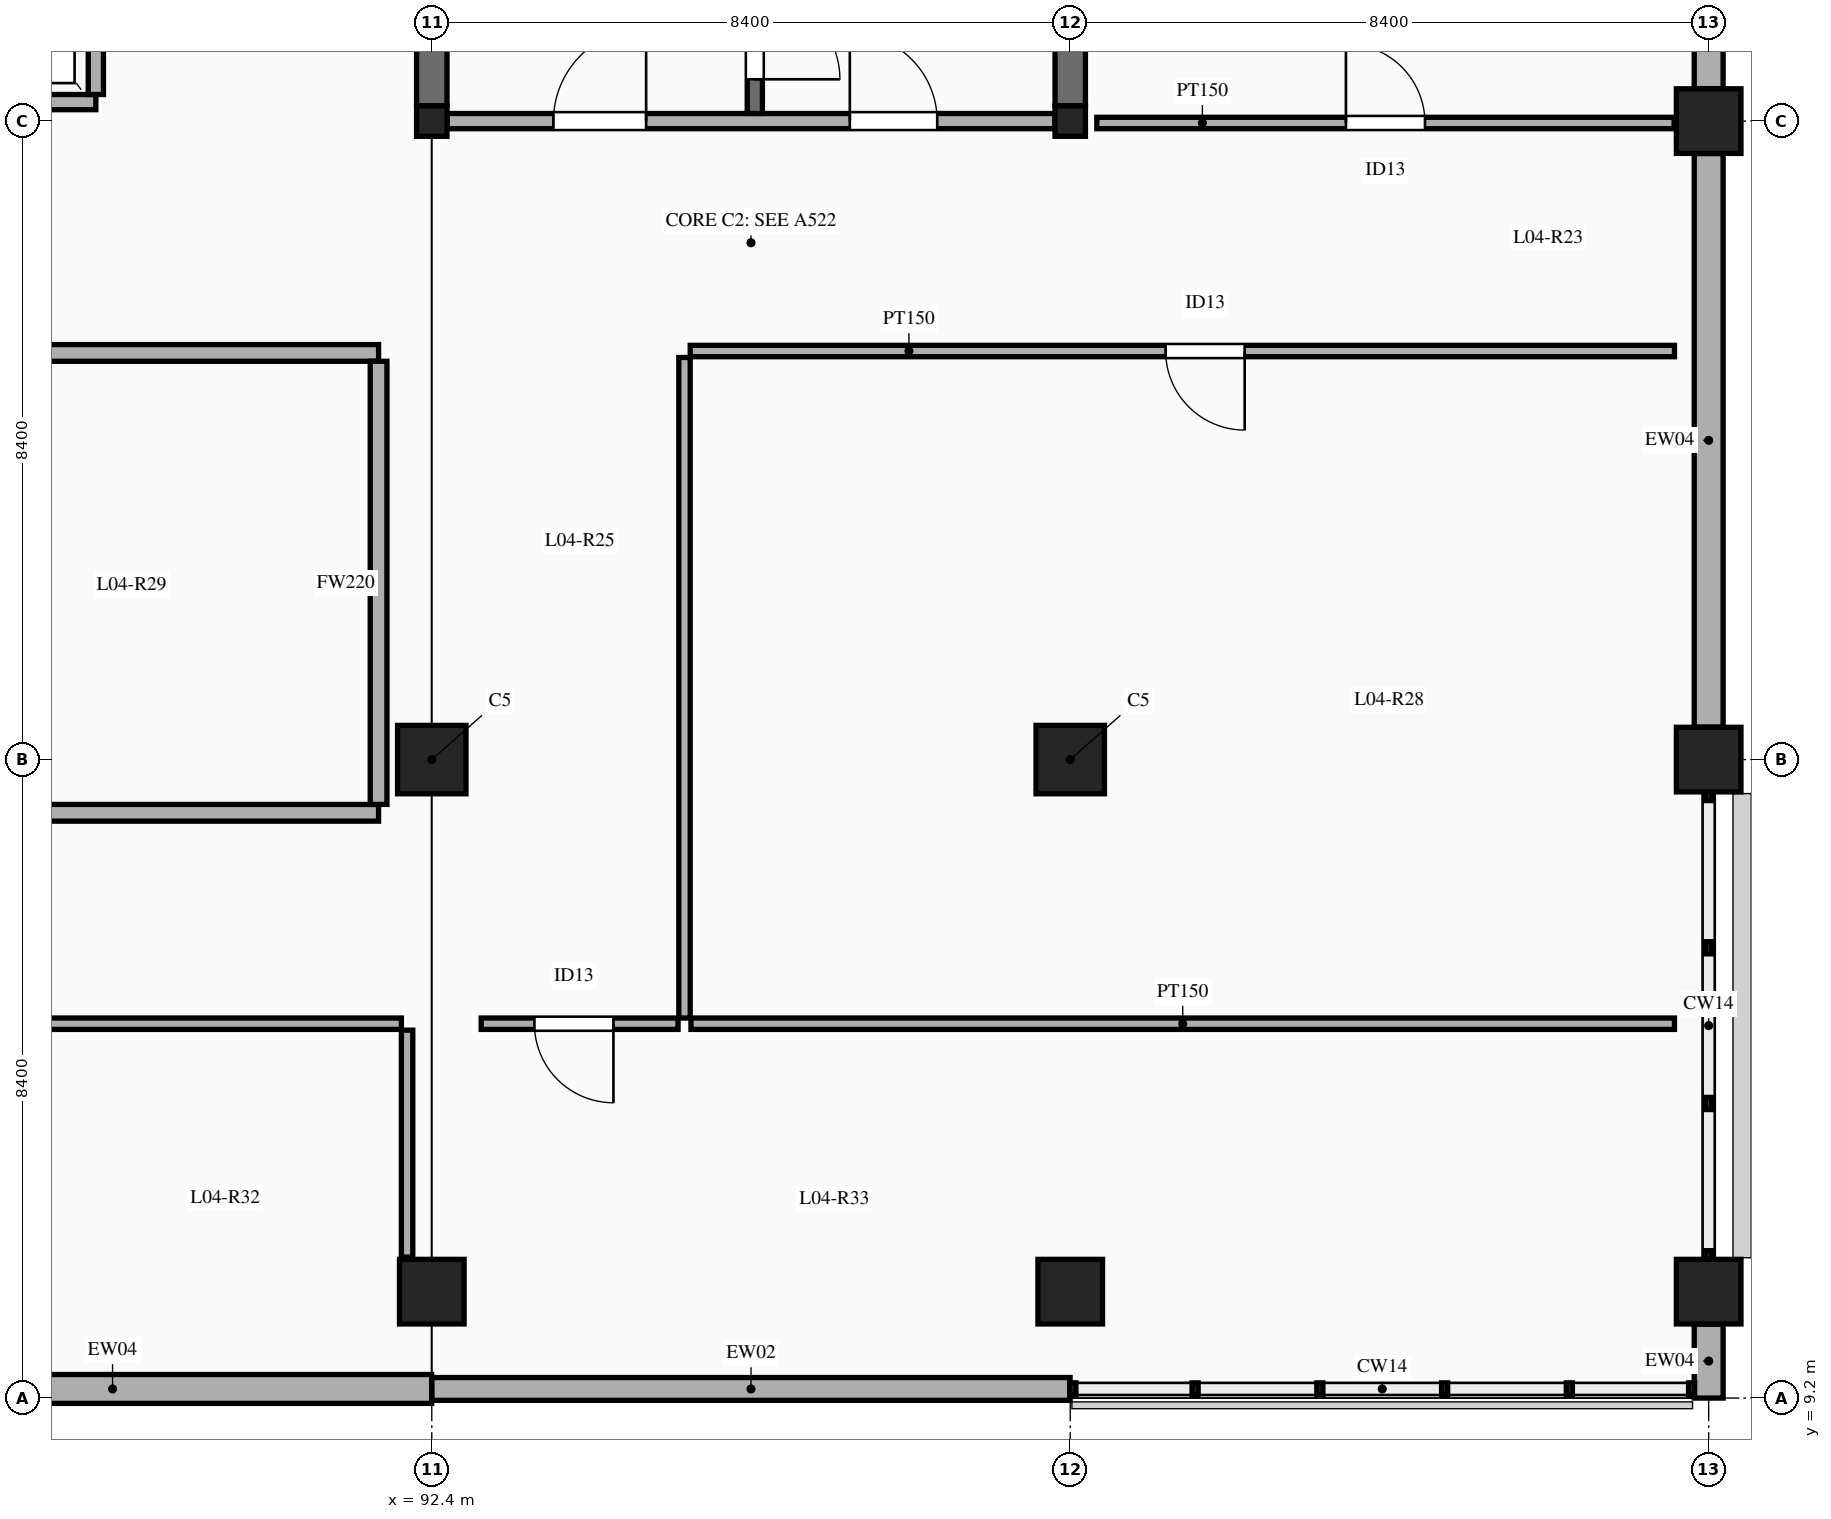
"""IFC4 building model, lengths in metres.
Left out: names, types, materials, properties, quantities, classifications, styles, units other than length and angle.
Written with IfcOpenShell. Run it as: python <this file> out.ifc"""

import sys

from ifc_helpers import new_model, si_unit, direction, frame, frame_2d, origin, origin_2d, place, context, subcontext, project, spatial, rectangle, extrude, element, fill, save


model = new_model("IFC4")
c1 = context("Model", 3, precision=1e-05, world=origin(), true_north=direction((0.0, 1.0)))
c2 = subcontext(c1, "Body", "Model", "MODEL_VIEW")
j1 = project(units=[si_unit("LENGTHUNIT", "METRE"), si_unit("PLANEANGLEUNIT", "RADIAN")], contexts=[c1])
p1 = place(None, origin())
s1 = spatial("IfcSite", under=j1, at=p1, CompositionType="ELEMENT")
p2 = place(p1, origin())
s2 = spatial("IfcBuilding", under=s1, at=p2, CompositionType="ELEMENT")
p3 = place(p2, frame((0.0, 0.0, 19.5)))
s3 = spatial("IfcBuildingStorey", under=s2, at=p3, CompositionType="ELEMENT", Elevation=19.5)
p4 = place(p3, frame((92.4, 10.6, 0.0), z_axis=(0.0, 0.0, 1.0), x_axis=(1.0, 0.0, 0.0)))
e1 = element("IfcColumn", 1, at=p4, inside=s3, PredefinedType="COLUMN", context=c2, shape_type="SweptSolid", body=[
    extrude(rectangle(XDim=0.85, YDim=0.85, at=origin_2d()), origin(), (0.0, 0.0, 1.0), 4.5),
])
p5 = place(p3, frame((92.4, 17.6, 0.0), z_axis=(0.0, 0.0, 1.0), x_axis=(1.0, 0.0, 0.0)))
e2 = element("IfcColumn", 2, at=p5, inside=s3, PredefinedType="COLUMN", context=c2, shape_type="SweptSolid", body=[
    extrude(rectangle(XDim=0.9, YDim=0.9, at=origin_2d()), origin(), (0.0, 0.0, 1.0), 4.5),
])
p6 = place(p3, frame((92.4, 26.0, 0.0), z_axis=(0.0, 0.0, 1.0), x_axis=(1.0, 0.0, 0.0)))
e3 = element("IfcColumn", 3, at=p6, inside=s3, PredefinedType="COLUMN", context=c2, shape_type="SweptSolid", body=[
    extrude(rectangle(XDim=0.4, YDim=0.4, at=origin_2d()), origin(), (0.0, 0.0, 1.0), 4.5),
])
p7 = place(p3, frame((100.8, 10.6, 0.0), z_axis=(0.0, 0.0, 1.0), x_axis=(1.0, 0.0, 0.0)))
e4 = element("IfcColumn", 4, at=p7, inside=s3, PredefinedType="COLUMN", context=c2, shape_type="SweptSolid", body=[
    extrude(rectangle(XDim=0.85, YDim=0.85, at=origin_2d()), origin(), (0.0, 0.0, 1.0), 4.5),
])
p8 = place(p3, frame((100.8, 17.6, 0.0), z_axis=(0.0, 0.0, 1.0), x_axis=(1.0, 0.0, 0.0)))
e5 = element("IfcColumn", 5, at=p8, inside=s3, PredefinedType="COLUMN", context=c2, shape_type="SweptSolid", body=[
    extrude(rectangle(XDim=0.9, YDim=0.9, at=origin_2d()), origin(), (0.0, 0.0, 1.0), 4.5),
])
p9 = place(p3, frame((100.8, 26.0, 0.0), z_axis=(0.0, 0.0, 1.0), x_axis=(1.0, 0.0, 0.0)))
e6 = element("IfcColumn", 6, at=p9, inside=s3, PredefinedType="COLUMN", context=c2, shape_type="SweptSolid", body=[
    extrude(rectangle(XDim=0.4, YDim=0.4, at=origin_2d()), origin(), (0.0, 0.0, 1.0), 4.5),
])
for number, where, z_axis, x_axis in (
    (7, (109.2, 10.6, 0.0), (0.0, 0.0, 1.0), (1.0, 0.0, 0.0)),
    (8, (109.2, 17.6, 0.0), (0.0, 0.0, 1.0), (1.0, 0.0, 0.0)),
    (9, (109.2, 26.0, 0.0), (0.0, 0.0, 1.0), (1.0, 0.0, 0.0)),
):
    element("IfcColumn", number, at=place(p3, frame(where, z_axis=z_axis, x_axis=x_axis)), inside=s3, PredefinedType="COLUMN", context=c2, shape_type="SweptSolid", body=[
        extrude(rectangle(XDim=0.85, YDim=0.85, at=origin_2d()), origin(), (0.0, 0.0, 1.0), 4.5),
    ])
for number, where, z_axis, x_axis in (
    (10, (92.4, 26.2, 0.0), (0.0, 0.0, 1.0), (0.0, 1.0, 0.0)),
    (11, (100.8, 26.2, 0.0), (0.0, 0.0, 1.0), (0.0, 1.0, 0.0)),
):
    element("IfcWall", number, at=place(p3, frame(where, z_axis=z_axis, x_axis=x_axis)), inside=s3, PredefinedType="SHEAR", context=c2, shape_type="SweptSolid", body=[
        extrude(rectangle(XDim=8.0, YDim=0.4, at=frame_2d((4.0, 0.0))), origin(), (0.0, 0.0, 1.0), 4.5),
    ])
p10 = place(p3, frame((109.2, 9.2, 0.0), z_axis=(0.0, 0.0, 1.0), x_axis=(0.0, 1.0, 0.0)))
e12 = element("IfcWall", 12, at=p10, inside=s3, PredefinedType="SOLIDWALL", context=c2, shape_type="SweptSolid", body=[
    extrude(rectangle(XDim=0.973, YDim=0.38, at=frame_2d((0.487, 0.0))), origin(), (0.0, 0.0, 1.0), 3.55),
])
p11 = place(p3, frame((84.002, 9.32, 0.0), z_axis=(0.0, 0.0, 1.0), x_axis=(1.0, 0.0, 0.0)))
e13 = element("IfcWall", 13, at=p11, inside=s3, PredefinedType="SOLIDWALL", context=c2, shape_type="SweptSolid", body=[
    extrude(rectangle(XDim=8.396, YDim=0.38, at=frame_2d((4.198, 0.0))), origin(), (0.0, 0.0, 1.0), 3.55),
])
p12 = place(p3, frame((92.402, 9.32, 0.0), z_axis=(0.0, 0.0, 1.0), x_axis=(1.0, 0.0, 0.0)))
e14 = element("IfcWall", 14, at=p12, inside=s3, PredefinedType="SOLIDWALL", context=c2, shape_type="SweptSolid", body=[
    extrude(rectangle(XDim=8.396, YDim=0.3, at=frame_2d((4.198, 0.0))), origin(), (0.0, 0.0, 1.0), 3.55),
])
for number, where, z_axis, x_axis in (
    (15, (109.2, 18.027, 0.0), (0.0, 0.0, 1.0), (0.0, 1.0, 0.0)),
    (16, (109.2, 26.427, 0.0), (0.0, 0.0, 1.0), (0.0, 1.0, 0.0)),
):
    element("IfcWall", number, at=place(p3, frame(where, z_axis=z_axis, x_axis=x_axis)), inside=s3, PredefinedType="SOLIDWALL", context=c2, shape_type="SweptSolid", body=[
        extrude(rectangle(XDim=7.546, YDim=0.38, at=frame_2d((3.773, 0.0))), origin(), (0.0, 0.0, 1.0), 3.55),
    ])
p13 = place(p3, frame((92.6, 26.0, 0.0), z_axis=(0.0, 0.0, 1.0), x_axis=(1.0, 0.0, 0.0)))
e17 = element("IfcWall", 17, at=p13, inside=s3, PredefinedType="SOLIDWALL", context=c2, shape_type="SweptSolid", body=[
    extrude(rectangle(XDim=8.0, YDim=0.2, at=frame_2d((4.0, 0.0))), origin(), (0.0, 0.0, 1.0), 3.53),
])
p14 = place(p13, frame((1.4, 0.0, 0.0)))
e18 = element("IfcOpeningElement", 18, at=p14, cuts=e17, PredefinedType="OPENING", context=c2, shape_type="SweptSolid", body=[
    extrude(rectangle(XDim=1.22, YDim=2.15, at=frame_2d((0.61, 1.075))), frame((0.0, 0.11, 0.0), z_axis=(0.0, -1.0, 0.0), x_axis=(1.0, 0.0, 0.0)), (0.0, 0.0, 1.0), 0.22),
])
p15 = place(p13, frame((5.3, 0.0, 0.0)))
e19 = element("IfcOpeningElement", 19, at=p15, cuts=e17, PredefinedType="OPENING", context=c2, shape_type="SweptSolid", body=[
    extrude(rectangle(XDim=1.15, YDim=2.15, at=frame_2d((0.575, 1.075))), frame((0.0, 0.11, 0.0), z_axis=(0.0, -1.0, 0.0), x_axis=(1.0, 0.0, 0.0)), (0.0, 0.0, 1.0), 0.22),
])
p16 = place(p3, frame((96.65, 26.1, 0.0), z_axis=(0.0, 0.0, 1.0), x_axis=(0.0, 1.0, 0.0)))
e20 = element("IfcWall", 20, at=p16, inside=s3, PredefinedType="SOLIDWALL", context=c2, shape_type="SweptSolid", body=[
    extrude(rectangle(XDim=8.1, YDim=0.2, at=frame_2d((4.05, 0.0))), origin(), (0.0, 0.0, 1.0), 4.25),
])
p17 = place(p16, frame((0.45, 0.0, 0.0)))
e21 = element("IfcOpeningElement", 21, at=p17, cuts=e20, PredefinedType="OPENING", context=c2, shape_type="SweptSolid", body=[
    extrude(rectangle(XDim=1.12, YDim=2.15, at=frame_2d((0.56, 1.075))), frame((0.0, 0.11, 0.0), z_axis=(0.0, -1.0, 0.0), x_axis=(1.0, 0.0, 0.0)), (0.0, 0.0, 1.0), 0.22),
])
p18 = place(p3, frame((85.62, 26.25, 0.0), z_axis=(0.0, 0.0, 1.0), x_axis=(1.0, 0.0, 0.0)))
e22 = element("IfcWall", 22, at=p18, inside=s3, PredefinedType="SOLIDWALL", context=c2, shape_type="SweptSolid", body=[
    extrude(rectangle(XDim=2.36, YDim=0.2, at=frame_2d((1.18, 0.0))), origin(), (0.0, 0.0, 1.0), 3.53),
])
p19 = place(p18, frame((0.605, 0.0, 0.0)))
e23 = element("IfcOpeningElement", 23, at=p19, cuts=e22, PredefinedType="OPENING", context=c2, shape_type="SweptSolid", body=[
    extrude(rectangle(XDim=1.15, YDim=2.2, at=frame_2d((0.575, 1.1))), frame((0.0, 0.11, 0.0), z_axis=(0.0, -1.0, 0.0), x_axis=(1.0, 0.0, 0.0)), (0.0, 0.0, 1.0), 0.22),
])
p20 = place(p3, frame((87.98, 26.35, 0.0), z_axis=(0.0, 0.0, 1.0), x_axis=(0.0, 1.0, 0.0)))
e24 = element("IfcWall", 24, at=p20, inside=s3, PredefinedType="SOLIDWALL", context=c2, shape_type="SweptSolid", body=[
    extrude(rectangle(XDim=2.9, YDim=0.2, at=frame_2d((1.45, 0.0))), origin(), (0.0, 0.0, 1.0), 3.93),
])
p21 = place(p3, frame((59.5, 22.95, 0.0), z_axis=(0.0, 0.0, 1.0), x_axis=(1.0, 0.0, 0.0)))
e25 = element("IfcWall", 25, at=p21, inside=s3, PredefinedType="SOLIDWALL", context=c2, shape_type="SweptSolid", body=[
    extrude(rectangle(XDim=32.2, YDim=0.22, at=frame_2d((16.1, 0.0))), origin(), (0.0, 0.0, 1.0), 3.45),
])
p22 = place(p21, frame((3.0, 0.0, 0.0)))
e26 = element("IfcOpeningElement", 26, at=p22, cuts=e25, PredefinedType="OPENING", context=c2, shape_type="SweptSolid", body=[
    extrude(rectangle(XDim=1.2, YDim=2.2, at=frame_2d((0.6, 1.1))), frame((0.0, 0.12, 0.0), z_axis=(0.0, -1.0, 0.0), x_axis=(1.0, 0.0, 0.0)), (0.0, 0.0, 1.0), 0.24),
])
p23 = place(p3, frame((59.5, 16.9, 0.0), z_axis=(0.0, 0.0, 1.0), x_axis=(1.0, 0.0, 0.0)))
e27 = element("IfcWall", 27, at=p23, inside=s3, PredefinedType="SOLIDWALL", context=c2, shape_type="SweptSolid", body=[
    extrude(rectangle(XDim=32.2, YDim=0.22, at=frame_2d((16.1, 0.0))), origin(), (0.0, 0.0, 1.0), 3.45),
])
p24 = place(p23, frame((19.7, 0.0, 0.0)))
e28 = element("IfcOpeningElement", 28, at=p24, cuts=e27, PredefinedType="OPENING", context=c2, shape_type="SweptSolid", body=[
    extrude(rectangle(XDim=1.05, YDim=2.15, at=frame_2d((0.525, 1.075))), frame((0.0, 0.12, 0.0), z_axis=(0.0, -1.0, 0.0), x_axis=(1.0, 0.0, 0.0)), (0.0, 0.0, 1.0), 0.24),
])
p25 = place(p3, frame((91.7, 17.01, 0.0), z_axis=(0.0, 0.0, 1.0), x_axis=(0.0, 1.0, 0.0)))
e29 = element("IfcWall", 29, at=p25, inside=s3, PredefinedType="SOLIDWALL", context=c2, shape_type="SweptSolid", body=[
    extrude(rectangle(XDim=5.83, YDim=0.22, at=frame_2d((2.915, 0.0))), origin(), (0.0, 0.0, 1.0), 3.45),
])
p26 = place(p3, frame((101.15, 25.975, 0.0), z_axis=(0.0, 0.0, 1.0), x_axis=(1.0, 0.0, 0.0)))
e30 = element("IfcWall", 30, at=p26, inside=s3, PredefinedType="PARTITIONING", context=c2, shape_type="SweptSolid", body=[
    extrude(rectangle(XDim=7.595, YDim=0.15, at=frame_2d((3.798, 0.0))), origin(), (0.0, 0.0, 1.0), 3.45),
])
p27 = place(p26, frame((3.278, 0.0, 0.0)))
e31 = element("IfcOpeningElement", 31, at=p27, cuts=e30, PredefinedType="OPENING", context=c2, shape_type="SweptSolid", body=[
    extrude(rectangle(XDim=1.04, YDim=2.15, at=frame_2d((0.52, 1.075))), frame((0.0, 0.085, 0.0), z_axis=(0.0, -1.0, 0.0), x_axis=(1.0, 0.0, 0.0)), (0.0, 0.0, 1.0), 0.17),
])
p28 = place(p3, frame((95.8, 22.975, 0.0), z_axis=(0.0, 0.0, 1.0), x_axis=(1.0, 0.0, 0.0)))
e32 = element("IfcWall", 32, at=p28, inside=s3, PredefinedType="PARTITIONING", context=c2, shape_type="SweptSolid", body=[
    extrude(rectangle(XDim=12.95, YDim=0.15, at=frame_2d((6.475, 0.0))), origin(), (0.0, 0.0, 1.0), 3.45),
])
p29 = place(p28, frame((6.255, 0.0, 0.0)))
e33 = element("IfcOpeningElement", 33, at=p29, cuts=e32, PredefinedType="OPENING", context=c2, shape_type="SweptSolid", body=[
    extrude(rectangle(XDim=1.04, YDim=2.15, at=frame_2d((0.52, 1.075))), frame((0.0, 0.085, 0.0), z_axis=(0.0, -1.0, 0.0), x_axis=(1.0, 0.0, 0.0)), (0.0, 0.0, 1.0), 0.17),
])
p30 = place(p3, frame((95.725, 14.2, 0.0), z_axis=(0.0, 0.0, 1.0), x_axis=(0.0, 1.0, 0.0)))
e34 = element("IfcWall", 34, at=p30, inside=s3, PredefinedType="PARTITIONING", context=c2, shape_type="SweptSolid", body=[
    extrude(rectangle(XDim=8.69, YDim=0.15, at=frame_2d((4.345, 0.0))), origin(), (0.0, 0.0, 1.0), 3.45),
])
p31 = place(p3, frame((93.05, 14.125, 0.0), z_axis=(0.0, 0.0, 1.0), x_axis=(1.0, 0.0, 0.0)))
e35 = element("IfcWall", 35, at=p31, inside=s3, PredefinedType="PARTITIONING", context=c2, shape_type="SweptSolid", body=[
    extrude(rectangle(XDim=2.59, YDim=0.15, at=frame_2d((1.295, 0.0))), origin(), (0.0, 0.0, 1.0), 3.45),
])
p32 = place(p31, frame((0.7, 0.0, 0.0)))
e36 = element("IfcOpeningElement", 36, at=p32, cuts=e35, PredefinedType="OPENING", context=c2, shape_type="SweptSolid", body=[
    extrude(rectangle(XDim=1.04, YDim=2.15, at=frame_2d((0.52, 1.075))), frame((0.0, 0.085, 0.0), z_axis=(0.0, -1.0, 0.0), x_axis=(1.0, 0.0, 0.0)), (0.0, 0.0, 1.0), 0.17),
])
p33 = place(p3, frame((79.95, 14.125, 0.0), z_axis=(0.0, 0.0, 1.0), x_axis=(1.0, 0.0, 0.0)))
e37 = element("IfcWall", 37, at=p33, inside=s3, PredefinedType="PARTITIONING", context=c2, shape_type="SweptSolid", body=[
    extrude(rectangle(XDim=12.05, YDim=0.15, at=frame_2d((6.025, 0.0))), origin(), (0.0, 0.0, 1.0), 3.45),
])
p34 = place(p33, frame((5.525, 0.0, 0.0)))
e38 = element("IfcOpeningElement", 38, at=p34, cuts=e37, PredefinedType="OPENING", context=c2, shape_type="SweptSolid", body=[
    extrude(rectangle(XDim=1.0, YDim=2.15, at=frame_2d((0.5, 1.075))), frame((0.0, 0.085, 0.0), z_axis=(0.0, -1.0, 0.0), x_axis=(1.0, 0.0, 0.0)), (0.0, 0.0, 1.0), 0.17),
])
p35 = place(p3, frame((95.81, 14.125, 0.0), z_axis=(0.0, 0.0, 1.0), x_axis=(1.0, 0.0, 0.0)))
e39 = element("IfcWall", 39, at=p35, inside=s3, PredefinedType="PARTITIONING", context=c2, shape_type="SweptSolid", body=[
    extrude(rectangle(XDim=12.94, YDim=0.15, at=frame_2d((6.47, 0.0))), origin(), (0.0, 0.0, 1.0), 3.45),
])
p36 = place(p3, frame((92.075, 11.055, 0.0), z_axis=(0.0, 0.0, 1.0), x_axis=(0.0, 1.0, 0.0)))
e40 = element("IfcWall", 40, at=p36, inside=s3, PredefinedType="PARTITIONING", context=c2, shape_type="SweptSolid", body=[
    extrude(rectangle(XDim=2.985, YDim=0.15, at=frame_2d((1.493, 0.0))), origin(), (0.0, 0.0, 1.0), 3.45),
])
p37 = place(p14, origin())
e41 = element("IfcDoor", 41, at=p37, inside=s3, OperationType="SINGLE_SWING_RIGHT", PredefinedType="DOOR", context=c2, shape_type="SweptSolid", body=[
    extrude(rectangle(XDim=1.22, YDim=2.15, at=frame_2d((0.61, 1.075))), frame((0.0, 0.025, 0.0), z_axis=(0.0, -1.0, 0.0), x_axis=(1.0, 0.0, 0.0)), (0.0, 0.0, 1.0), 0.05),
])
fill(e18, e41)
p38 = place(p15, origin())
e42 = element("IfcDoor", 42, at=p38, inside=s3, OperationType="SINGLE_SWING_LEFT", PredefinedType="DOOR", context=c2, shape_type="SweptSolid", body=[
    extrude(rectangle(XDim=1.15, YDim=2.15, at=frame_2d((0.575, 1.075))), frame((0.0, 0.025, 0.0), z_axis=(0.0, -1.0, 0.0), x_axis=(1.0, 0.0, 0.0)), (0.0, 0.0, 1.0), 0.05),
])
fill(e19, e42)
p39 = place(p17, frame((1.12, 0.0, 0.0), z_axis=(0.0, 0.0, 1.0), x_axis=(-1.0, 0.0, 0.0)))
e43 = element("IfcDoor", 43, at=p39, inside=s3, OperationType="SINGLE_SWING_RIGHT", PredefinedType="DOOR", context=c2, shape_type="SweptSolid", body=[
    extrude(rectangle(XDim=1.12, YDim=2.15, at=frame_2d((0.56, 1.075))), frame((0.0, 0.025, 0.0), z_axis=(0.0, -1.0, 0.0), x_axis=(1.0, 0.0, 0.0)), (0.0, 0.0, 1.0), 0.05),
])
fill(e21, e43)
p40 = place(p27, origin())
e44 = element("IfcDoor", 44, at=p40, inside=s3, OperationType="SINGLE_SWING_LEFT", PredefinedType="DOOR", context=c2, shape_type="SweptSolid", body=[
    extrude(rectangle(XDim=1.04, YDim=2.15, at=frame_2d((0.52, 1.075))), frame((0.0, 0.025, 0.0), z_axis=(0.0, -1.0, 0.0), x_axis=(1.0, 0.0, 0.0)), (0.0, 0.0, 1.0), 0.05),
])
fill(e31, e44)
p41 = place(p29, frame((1.04, 0.0, 0.0), z_axis=(0.0, 0.0, 1.0), x_axis=(-1.0, 0.0, 0.0)))
e45 = element("IfcDoor", 45, at=p41, inside=s3, OperationType="SINGLE_SWING_LEFT", PredefinedType="DOOR", context=c2, shape_type="SweptSolid", body=[
    extrude(rectangle(XDim=1.04, YDim=2.15, at=frame_2d((0.52, 1.075))), frame((0.0, 0.025, 0.0), z_axis=(0.0, -1.0, 0.0), x_axis=(1.0, 0.0, 0.0)), (0.0, 0.0, 1.0), 0.05),
])
fill(e33, e45)
p42 = place(p32, frame((1.04, 0.0, 0.0), z_axis=(0.0, 0.0, 1.0), x_axis=(-1.0, 0.0, 0.0)))
e46 = element("IfcDoor", 46, at=p42, inside=s3, OperationType="SINGLE_SWING_LEFT", PredefinedType="DOOR", context=c2, shape_type="SweptSolid", body=[
    extrude(rectangle(XDim=1.04, YDim=2.15, at=frame_2d((0.52, 1.075))), frame((0.0, 0.025, 0.0), z_axis=(0.0, -1.0, 0.0), x_axis=(1.0, 0.0, 0.0)), (0.0, 0.0, 1.0), 0.05),
])
fill(e36, e46)
save(model, sys.argv[1])
